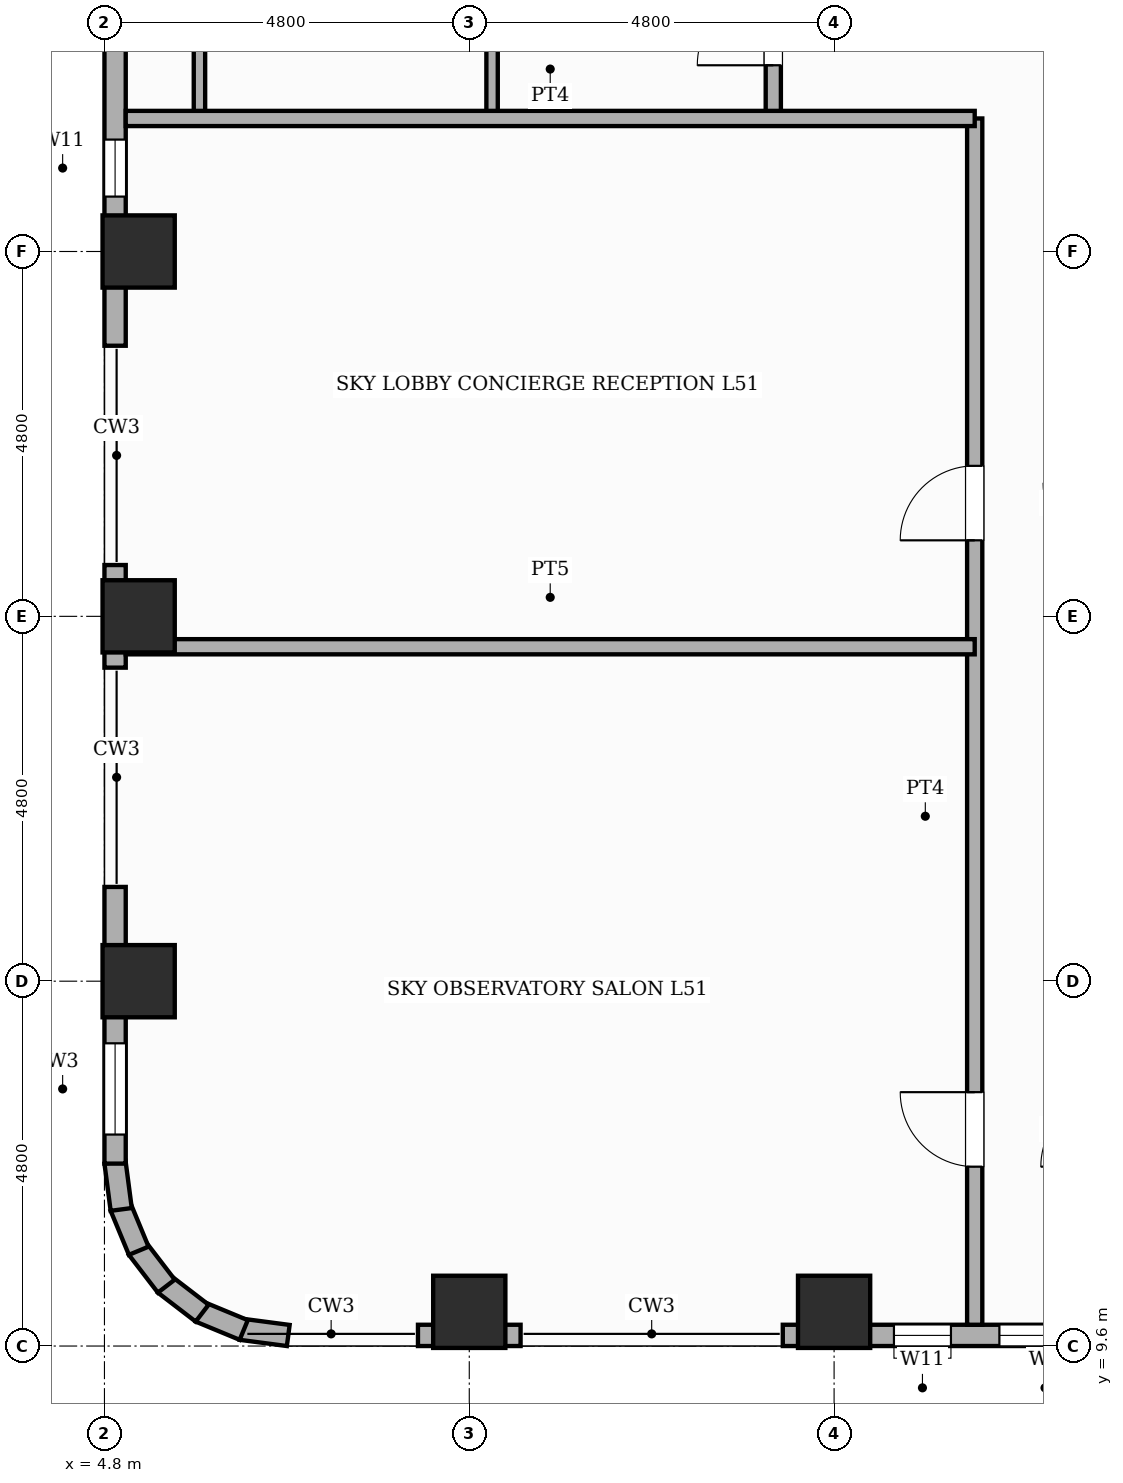
"""IFC4 building model, lengths in metres.
Left out: names, types, materials, properties, quantities, classifications, styles, units other than length and angle.
Written with IfcOpenShell. Run it as: python <this file> out.ifc"""

import sys

from ifc_helpers import new_model, si_unit, direction, frame, frame_2d, origin, origin_2d, place, context, subcontext, project, spatial, rectangle, extrude, element, fill, save


model = new_model("IFC4")
c1 = context("Model", 3, precision=1e-05, world=origin(), true_north=direction((0.0, 1.0)))
c2 = subcontext(c1, "Body", "Model", "MODEL_VIEW")
j1 = project(units=[si_unit("LENGTHUNIT", "METRE"), si_unit("PLANEANGLEUNIT", "RADIAN")], contexts=[c1])
p1 = place(None, origin())
s1 = spatial("IfcSite", under=j1, at=p1, CompositionType="ELEMENT")
p2 = place(p1, origin())
s2 = spatial("IfcBuilding", under=s1, at=p2, CompositionType="ELEMENT")
p3 = place(p2, frame((0.0, 0.0, 193.6)))
s3 = spatial("IfcBuildingStorey", under=s2, at=p3, CompositionType="ELEMENT", Elevation=193.6)
for number, where, z_axis, x_axis in (
    (1, (5.25, 14.4, 0.0), (0.0, 0.0, 1.0), (1.0, 0.0, 0.0)),
    (2, (5.25, 19.2, 0.0), (0.0, 0.0, 1.0), (1.0, 0.0, 0.0)),
    (3, (5.25, 24.0, 0.0), (0.0, 0.0, 1.0), (1.0, 0.0, 0.0)),
    (4, (9.6, 10.05, 0.0), (0.0, 0.0, 1.0), (1.0, 0.0, 0.0)),
    (5, (14.4, 10.05, 0.0), (0.0, 0.0, 1.0), (1.0, 0.0, 0.0)),
):
    element("IfcColumn", number, at=place(p3, frame(where, z_axis=z_axis, x_axis=x_axis)), inside=s3, PredefinedType="COLUMN", context=c2, shape_type="SweptSolid", body=[
        extrude(rectangle(XDim=0.95, YDim=0.95, at=origin_2d()), origin(), (0.0, 0.0, 1.0), 4.8),
    ])
p4 = place(p3, frame((21.6, 9.74, 0.0), z_axis=(0.0, 0.0, 1.0), x_axis=(-1.0, 0.0, 0.0)))
e6 = element("IfcWall", 6, at=p4, inside=s3, PredefinedType="STANDARD", context=c2, shape_type="SweptSolid", body=[
    extrude(rectangle(XDim=7.875, YDim=0.28, at=frame_2d((3.938, 0.0))), origin(), (0.0, 0.0, 1.0), 3.78),
])
p5 = place(p4, frame((3.825, 0.0, 0.8)))
e7 = element("IfcOpeningElement", 7, at=p5, cuts=e6, PredefinedType="OPENING", context=c2, shape_type="SweptSolid", body=[
    extrude(rectangle(XDim=1.2, YDim=1.8, at=frame_2d((0.6, 0.9))), frame((0.0, 0.15, 0.0), z_axis=(0.0, -1.0, 0.0), x_axis=(1.0, 0.0, 0.0)), (0.0, 0.0, 1.0), 0.3),
])
p6 = place(p4, frame((0.383, 0.0, 0.8)))
e8 = element("IfcOpeningElement", 8, at=p6, cuts=e6, PredefinedType="OPENING", context=c2, shape_type="SweptSolid", body=[
    extrude(rectangle(XDim=1.2, YDim=1.8, at=frame_2d((0.6, 0.9))), frame((0.0, 0.15, 0.0), z_axis=(0.0, -1.0, 0.0), x_axis=(1.0, 0.0, 0.0)), (0.0, 0.0, 1.0), 0.3),
])
p7 = place(p4, frame((5.663, 0.0, 0.45)))
e9 = element("IfcOpeningElement", 9, at=p7, cuts=e6, PredefinedType="OPENING", context=c2, shape_type="SweptSolid", body=[
    extrude(rectangle(XDim=0.75, YDim=1.8, at=frame_2d((0.375, 0.9))), frame((0.0, 0.15, 0.0), z_axis=(0.0, -1.0, 0.0), x_axis=(1.0, 0.0, 0.0)), (0.0, 0.0, 1.0), 0.3),
])
p8 = place(p3, frame((10.275, 9.74, 0.0), z_axis=(0.0, 0.0, 1.0), x_axis=(-1.0, 0.0, 0.0)))
e10 = element("IfcWall", 10, at=p8, inside=s3, PredefinedType="STANDARD", context=c2, shape_type="SweptSolid", body=[
    extrude(rectangle(XDim=1.35, YDim=0.28, at=frame_2d((0.675, 0.0))), origin(), (0.0, 0.0, 1.0), 3.78),
])
p9 = place(p3, frame((7.218, 9.739, 0.0), z_axis=(0.0, 0.0, 1.0), x_axis=(-0.9914410257, 0.130555323746, 0.0)))
e11 = element("IfcWall", 11, at=p9, inside=s3, PredefinedType="STANDARD", context=c2, shape_type="SweptSolid", body=[
    extrude(rectangle(XDim=0.626, YDim=0.28, at=frame_2d((0.313, 0.0))), origin(), (0.0, 0.0, 1.0), 4.5),
])
p10 = place(p3, frame((6.632, 9.811, 0.0), z_axis=(0.0, 0.0, 1.0), x_axis=(-0.923836271867, 0.382787856107, 0.0)))
e12 = element("IfcWall", 12, at=p10, inside=s3, PredefinedType="STANDARD", context=c2, shape_type="SweptSolid", body=[
    extrude(rectangle(XDim=0.626, YDim=0.28, at=frame_2d((0.313, 0.0))), origin(), (0.0, 0.0, 1.0), 4.5),
])
for number, where, z_axis, x_axis in (
    (13, (6.085, 10.033, 0.0), (0.0, 0.0, 1.0), (-0.793, 0.609, 0.0)),
    (14, (5.614, 10.388, 0.0), (0.0, 0.0, 1.0), (-0.609, 0.793, 0.0)),
    (15, (5.251, 10.854, 0.0), (0.0, 0.0, 1.0), (-0.383, 0.924, 0.0)),
    (16, (5.021, 11.397, 0.0), (0.0, 0.0, 1.0), (-0.131, 0.991, 0.0)),
):
    element("IfcWall", number, at=place(p3, frame(where, z_axis=z_axis, x_axis=x_axis)), inside=s3, PredefinedType="STANDARD", context=c2, shape_type="SweptSolid", body=[
        extrude(rectangle(XDim=0.626, YDim=0.28, at=frame_2d((0.313, 0.0))), origin(), (0.0, 0.0, 1.0), 4.5),
    ])
p11 = place(p3, frame((4.94, 12.0, 0.0), z_axis=(0.0, 0.0, 1.0), x_axis=(0.0, 1.0, 0.0)))
e17 = element("IfcWall", 17, at=p11, inside=s3, PredefinedType="STANDARD", context=c2, shape_type="SweptSolid", body=[
    extrude(rectangle(XDim=3.64, YDim=0.28, at=frame_2d((1.82, 0.0))), origin(), (0.0, 0.0, 1.0), 4.5),
])
p12 = place(p11, frame((0.383, 0.0, 0.8)))
e18 = element("IfcOpeningElement", 18, at=p12, cuts=e17, PredefinedType="OPENING", context=c2, shape_type="SweptSolid", body=[
    extrude(rectangle(XDim=1.2, YDim=1.8, at=frame_2d((0.6, 0.9))), frame((0.0, 0.15, 0.0), z_axis=(0.0, -1.0, 0.0), x_axis=(1.0, 0.0, 0.0)), (0.0, 0.0, 1.0), 0.3),
])
p13 = place(p3, frame((4.94, 18.525, 0.0), z_axis=(0.0, 0.0, 1.0), x_axis=(0.0, 1.0, 0.0)))
e19 = element("IfcWall", 19, at=p13, inside=s3, PredefinedType="STANDARD", context=c2, shape_type="SweptSolid", body=[
    extrude(rectangle(XDim=1.35, YDim=0.28, at=frame_2d((0.675, 0.0))), origin(), (0.0, 0.0, 1.0), 4.5),
])
p14 = place(p3, frame((4.94, 22.76, 0.0), z_axis=(0.0, 0.0, 1.0), x_axis=(0.0, 1.0, 0.0)))
e20 = element("IfcWall", 20, at=p14, inside=s3, PredefinedType="STANDARD", context=c2, shape_type="SweptSolid", body=[
    extrude(rectangle(XDim=22.84, YDim=0.28, at=frame_2d((11.42, 0.0))), origin(), (0.0, 0.0, 1.0), 3.78),
])
p15 = place(p14, frame((1.962, 0.0, 0.45)))
e21 = element("IfcOpeningElement", 21, at=p15, cuts=e20, PredefinedType="OPENING", context=c2, shape_type="SweptSolid", body=[
    extrude(rectangle(XDim=0.75, YDim=1.8, at=frame_2d((0.375, 0.9))), frame((0.0, 0.15, 0.0), z_axis=(0.0, -1.0, 0.0), x_axis=(1.0, 0.0, 0.0)), (0.0, 0.0, 1.0), 0.3),
])
p16 = place(p3, frame((13.6, 25.75, 0.0), z_axis=(0.0, 0.0, 1.0), x_axis=(0.0, 1.0, 0.0)))
e22 = element("IfcWall", 22, at=p16, inside=s3, PredefinedType="POLYGONAL", context=c2, shape_type="SweptSolid", body=[
    extrude(rectangle(XDim=5.15, YDim=0.2, at=frame_2d((2.575, 0.0))), origin(), (0.0, 0.0, 1.0), 4.5),
])
p17 = place(p16, frame((0.7, 0.0, 0.0)))
e23 = element("IfcOpeningElement", 23, at=p17, cuts=e22, PredefinedType="OPENING", context=c2, shape_type="SweptSolid", body=[
    extrude(rectangle(XDim=1.0, YDim=2.15, at=frame_2d((0.5, 1.075))), frame((0.0, 0.11, 0.0), z_axis=(0.0, -1.0, 0.0), x_axis=(1.0, 0.0, 0.0)), (0.0, 0.0, 1.0), 0.22),
])
p18 = place(p3, frame((6.05, 25.75, 0.0), z_axis=(0.0, 0.0, 1.0), x_axis=(0.0, 1.0, 0.0)))
e24 = element("IfcWall", 24, at=p18, inside=s3, PredefinedType="PARTITIONING", context=c2, shape_type="SweptSolid", body=[
    extrude(rectangle(XDim=5.15, YDim=0.15, at=frame_2d((2.575, 0.0))), origin(), (0.0, 0.0, 1.0), 4.5),
])
p19 = place(p3, frame((9.9, 25.75, 0.0), z_axis=(0.0, 0.0, 1.0), x_axis=(0.0, 1.0, 0.0)))
e25 = element("IfcWall", 25, at=p19, inside=s3, PredefinedType="PARTITIONING", context=c2, shape_type="SweptSolid", body=[
    extrude(rectangle(XDim=5.15, YDim=0.15, at=frame_2d((2.575, 0.0))), origin(), (0.0, 0.0, 1.0), 4.5),
])
p20 = place(p19, frame((1.2, 0.0, 0.0)))
e26 = element("IfcOpeningElement", 26, at=p20, cuts=e25, PredefinedType="OPENING", context=c2, shape_type="SweptSolid", body=[
    extrude(rectangle(XDim=0.95, YDim=2.15, at=frame_2d((0.475, 1.075))), frame((0.0, 0.085, 0.0), z_axis=(0.0, -1.0, 0.0), x_axis=(1.0, 0.0, 0.0)), (0.0, 0.0, 1.0), 0.17),
])
p21 = place(p3, frame((16.25, 9.88, 0.0), z_axis=(0.0, 0.0, 1.0), x_axis=(0.0, 1.0, 0.0)))
e27 = element("IfcWall", 27, at=p21, inside=s3, PredefinedType="PARTITIONING", context=c2, shape_type="SweptSolid", body=[
    extrude(rectangle(XDim=15.87, YDim=0.2, at=frame_2d((7.935, 0.0))), origin(), (0.0, 0.0, 1.0), 4.5),
])
p22 = place(p21, frame((10.32, 0.0, 0.0)))
e28 = element("IfcOpeningElement", 28, at=p22, cuts=e27, PredefinedType="OPENING", context=c2, shape_type="SweptSolid", body=[
    extrude(rectangle(XDim=0.98, YDim=2.18, at=frame_2d((0.49, 1.09))), frame((0.0, 0.11, 0.0), z_axis=(0.0, -1.0, 0.0), x_axis=(1.0, 0.0, 0.0)), (0.0, 0.0, 1.0), 0.22),
])
p23 = place(p21, frame((2.08, 0.0, 0.0)))
e29 = element("IfcOpeningElement", 29, at=p23, cuts=e27, PredefinedType="OPENING", context=c2, shape_type="SweptSolid", body=[
    extrude(rectangle(XDim=0.98, YDim=2.18, at=frame_2d((0.49, 1.09))), frame((0.0, 0.11, 0.0), z_axis=(0.0, -1.0, 0.0), x_axis=(1.0, 0.0, 0.0)), (0.0, 0.0, 1.0), 0.22),
])
p24 = place(p3, frame((5.08, 25.75, 0.0), z_axis=(0.0, 0.0, 1.0), x_axis=(1.0, 0.0, 0.0)))
e30 = element("IfcWall", 30, at=p24, inside=s3, PredefinedType="PARTITIONING", context=c2, shape_type="SweptSolid", body=[
    extrude(rectangle(XDim=11.17, YDim=0.2, at=frame_2d((5.585, 0.0))), origin(), (0.0, 0.0, 1.0), 4.5),
])
p25 = place(p3, frame((5.08, 18.8, 0.0), z_axis=(0.0, 0.0, 1.0), x_axis=(1.0, 0.0, 0.0)))
e31 = element("IfcWall", 31, at=p25, inside=s3, PredefinedType="SOLIDWALL", context=c2, shape_type="SweptSolid", body=[
    extrude(rectangle(XDim=11.17, YDim=0.2, at=frame_2d((5.585, 0.0))), origin(), (0.0, 0.0, 1.0), 4.5),
])
p26 = place(p5, origin())
e32 = element("IfcWindow", 32, at=p26, inside=s3, PartitioningType="SINGLE_PANEL", PredefinedType="WINDOW", context=c2, shape_type="SweptSolid", body=[
    extrude(rectangle(XDim=1.2, YDim=1.8, at=frame_2d((0.6, 0.9))), frame((0.0, 0.03, 0.0), z_axis=(0.0, -1.0, 0.0), x_axis=(1.0, 0.0, 0.0)), (0.0, 0.0, 1.0), 0.06),
])
fill(e7, e32)
p27 = place(p7, origin())
e33 = element("IfcWindow", 33, at=p27, inside=s3, PartitioningType="SINGLE_PANEL", PredefinedType="WINDOW", context=c2, shape_type="SweptSolid", body=[
    extrude(rectangle(XDim=0.75, YDim=1.8, at=frame_2d((0.375, 0.9))), frame((0.0, 0.03, 0.0), z_axis=(0.0, -1.0, 0.0), x_axis=(1.0, 0.0, 0.0)), (0.0, 0.0, 1.0), 0.06),
])
fill(e9, e33)
p28 = place(p12, origin())
e34 = element("IfcWindow", 34, at=p28, inside=s3, PartitioningType="SINGLE_PANEL", PredefinedType="WINDOW", context=c2, shape_type="SweptSolid", body=[
    extrude(rectangle(XDim=1.2, YDim=1.8, at=frame_2d((0.6, 0.9))), frame((0.0, 0.03, 0.0), z_axis=(0.0, -1.0, 0.0), x_axis=(1.0, 0.0, 0.0)), (0.0, 0.0, 1.0), 0.06),
])
fill(e18, e34)
p29 = place(p15, origin())
e35 = element("IfcWindow", 35, at=p29, inside=s3, PartitioningType="SINGLE_PANEL", PredefinedType="WINDOW", context=c2, shape_type="SweptSolid", body=[
    extrude(rectangle(XDim=0.75, YDim=1.8, at=frame_2d((0.375, 0.9))), frame((0.0, 0.03, 0.0), z_axis=(0.0, -1.0, 0.0), x_axis=(1.0, 0.0, 0.0)), (0.0, 0.0, 1.0), 0.06),
])
fill(e21, e35)
p30 = place(p17, origin())
e36 = element("IfcDoor", 36, at=p30, inside=s3, OperationType="SINGLE_SWING_LEFT", PredefinedType="DOOR", context=c2, shape_type="SweptSolid", body=[
    extrude(rectangle(XDim=1.0, YDim=2.15, at=frame_2d((0.5, 1.075))), frame((0.0, 0.025, 0.0), z_axis=(0.0, -1.0, 0.0), x_axis=(1.0, 0.0, 0.0)), (0.0, 0.0, 1.0), 0.05),
])
fill(e23, e36)
p31 = place(p22, origin())
e37 = element("IfcDoor", 37, at=p31, inside=s3, OperationType="SINGLE_SWING_LEFT", PredefinedType="DOOR", context=c2, shape_type="SweptSolid", body=[
    extrude(rectangle(XDim=0.98, YDim=2.18, at=frame_2d((0.49, 1.09))), frame((0.0, 0.025, 0.0), z_axis=(0.0, -1.0, 0.0), x_axis=(1.0, 0.0, 0.0)), (0.0, 0.0, 1.0), 0.05),
])
fill(e28, e37)
p32 = place(p23, origin())
e38 = element("IfcDoor", 38, at=p32, inside=s3, OperationType="SINGLE_SWING_RIGHT", PredefinedType="DOOR", context=c2, shape_type="SweptSolid", body=[
    extrude(rectangle(XDim=0.98, YDim=2.18, at=frame_2d((0.49, 1.09))), frame((0.0, 0.025, 0.0), z_axis=(0.0, -1.0, 0.0), x_axis=(1.0, 0.0, 0.0)), (0.0, 0.0, 1.0), 0.05),
])
fill(e29, e38)
save(model, sys.argv[1])
